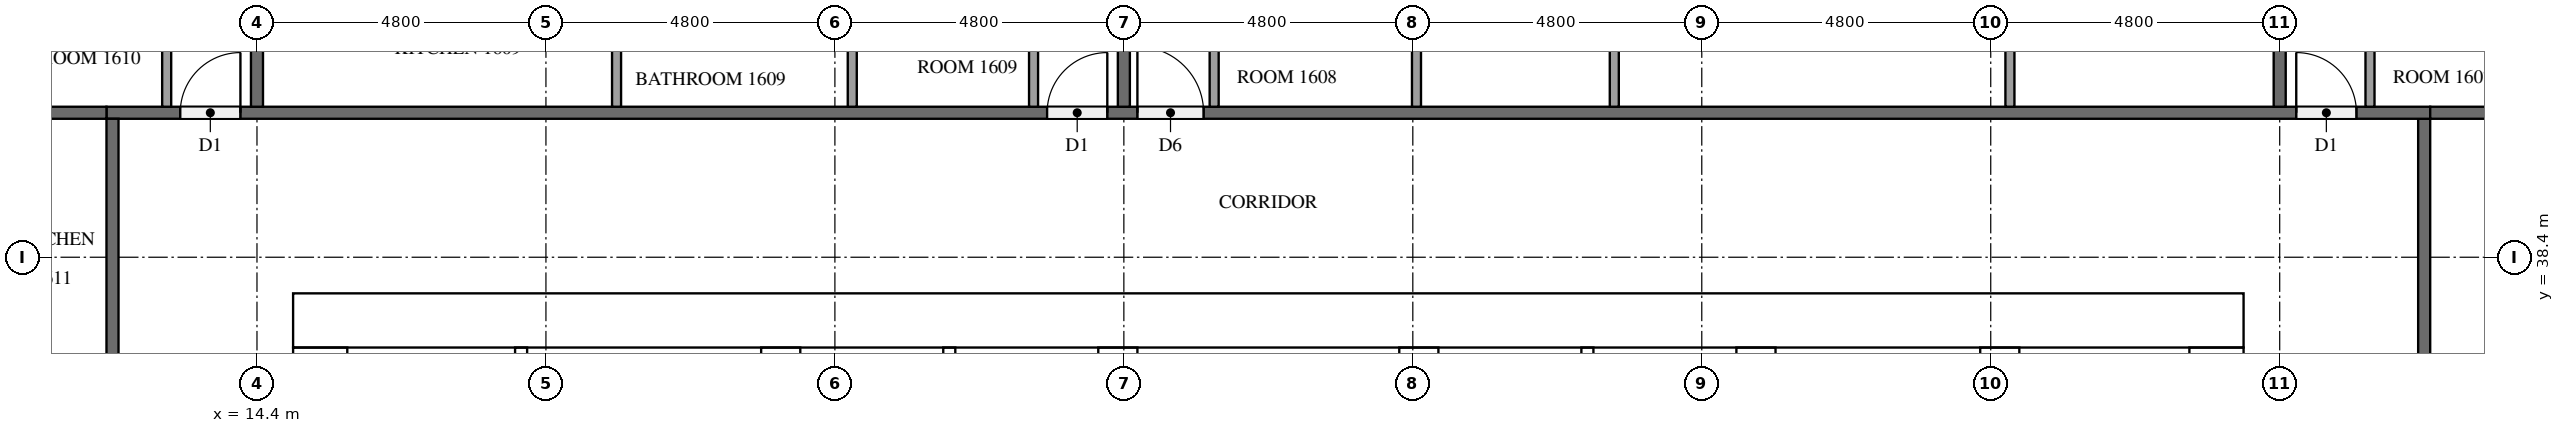
"""IFC4 building model, lengths in metres.
Left out: names, types, materials, properties, quantities, classifications, styles, units other than length and angle.
Written with IfcOpenShell. Run it as: python <this file> out.ifc"""

import sys

from ifc_helpers import new_model, si_unit, direction, frame, frame_2d, origin, place, context, subcontext, project, spatial, rectangle, extrude, element, fill, save


model = new_model("IFC4")
c1 = context("Model", 3, precision=1e-05, world=origin(), true_north=direction((0.0, 1.0)))
c2 = subcontext(c1, "Body", "Model", "MODEL_VIEW")
j1 = project(units=[si_unit("LENGTHUNIT", "METRE"), si_unit("PLANEANGLEUNIT", "RADIAN")], contexts=[c1])
p1 = place(None, origin())
s1 = spatial("IfcSite", under=j1, at=p1, CompositionType="ELEMENT")
p2 = place(p1, origin())
s2 = spatial("IfcBuilding", under=s1, at=p2, CompositionType="ELEMENT")
p3 = place(p2, frame((0.0, 0.0, 66.3)))
s3 = spatial("IfcBuildingStorey", under=s2, at=p3, CompositionType="ELEMENT", Elevation=66.3)
p4 = place(p3, frame((15.0, 37.35, 0.0), z_axis=(0.0, 0.0, 1.0), x_axis=(1.0, 0.0, 0.0)))
e1 = element("IfcWall", 1, at=p4, inside=s3, PredefinedType="SHEAR", context=c2, shape_type="SweptSolid", body=[
    extrude(rectangle(XDim=32.4, YDim=0.9, at=frame_2d((16.2, 0.0))), origin(), (0.0, 0.0, 1.0), 3.2),
])
p5 = place(p4, frame((15.3, 0.0, 0.0)))
e2 = element("IfcOpeningElement", 2, at=p5, cuts=e1, PredefinedType="OPENING", context=c2, shape_type="SweptSolid", body=[
    extrude(rectangle(XDim=1.8, YDim=2.1, at=frame_2d((0.9, 1.05))), frame((0.0, 0.46, 0.0), z_axis=(0.0, -1.0, 0.0), x_axis=(1.0, 0.0, 0.0)), (0.0, 0.0, 1.0), 0.92),
])
p6 = place(p4, frame((1.794, 0.0, 0.0)))
e3 = element("IfcOpeningElement", 3, at=p6, cuts=e1, PredefinedType="OPENING", context=c2, shape_type="SweptSolid", body=[
    extrude(rectangle(XDim=1.0, YDim=2.1, at=frame_2d((0.5, 1.05))), frame((0.0, 0.46, 0.0), z_axis=(0.0, -1.0, 0.0), x_axis=(1.0, 0.0, 0.0)), (0.0, 0.0, 1.0), 0.92),
])
p7 = place(p4, frame((5.331, 0.0, 0.0)))
e4 = element("IfcOpeningElement", 4, at=p7, cuts=e1, PredefinedType="OPENING", context=c2, shape_type="SweptSolid", body=[
    extrude(rectangle(XDim=1.0, YDim=2.1, at=frame_2d((0.5, 1.05))), frame((0.0, 0.46, 0.0), z_axis=(0.0, -1.0, 0.0), x_axis=(1.0, 0.0, 0.0)), (0.0, 0.0, 1.0), 0.92),
])
p8 = place(p3, frame((15.45, 15.9, 0.0), z_axis=(0.0, 0.0, 1.0), x_axis=(0.0, 1.0, 0.0)))
e5 = element("IfcWall", 5, at=p8, inside=s3, PredefinedType="SHEAR", context=c2, shape_type="SweptSolid", body=[
    extrude(rectangle(XDim=21.0, YDim=0.9, at=frame_2d((10.5, 0.0))), origin(), (0.0, 0.0, 1.0), 3.2),
])
p9 = place(p8, frame((4.86, 0.0, 0.0)))
e6 = element("IfcOpeningElement", 6, at=p9, cuts=e5, PredefinedType="OPENING", context=c2, shape_type="SweptSolid", body=[
    extrude(rectangle(XDim=1.2, YDim=2.1, at=frame_2d((0.6, 1.05))), frame((0.0, 0.46, 0.0), z_axis=(0.0, -1.0, 0.0), x_axis=(1.0, 0.0, 0.0)), (0.0, 0.0, 1.0), 0.92),
])
p10 = place(p3, frame((46.95, 15.9, 0.0), z_axis=(0.0, 0.0, 1.0), x_axis=(0.0, 1.0, 0.0)))
e7 = element("IfcWall", 7, at=p10, inside=s3, PredefinedType="SHEAR", context=c2, shape_type="SweptSolid", body=[
    extrude(rectangle(XDim=21.0, YDim=0.9, at=frame_2d((10.5, 0.0))), origin(), (0.0, 0.0, 1.0), 3.2),
])
p11 = place(p10, frame((10.2, 0.0, 0.0)))
e8 = element("IfcOpeningElement", 8, at=p11, cuts=e7, PredefinedType="OPENING", context=c2, shape_type="SweptSolid", body=[
    extrude(rectangle(XDim=1.2, YDim=2.1, at=frame_2d((0.6, 1.05))), frame((0.0, 0.46, 0.0), z_axis=(0.0, -1.0, 0.0), x_axis=(1.0, 0.0, 0.0)), (0.0, 0.0, 1.0), 0.92),
])
p12 = place(p3, frame((23.1, 15.9, 0.0), z_axis=(0.0, 0.0, 1.0), x_axis=(0.0, 1.0, 0.0)))
e9 = element("IfcWall", 9, at=p12, inside=s3, PredefinedType="SHEAR", context=c2, shape_type="SweptSolid", body=[
    extrude(rectangle(XDim=21.0, YDim=0.65, at=frame_2d((10.5, 0.0))), origin(), (0.0, 0.0, 1.0), 3.2),
])
p13 = place(p3, frame((39.3, 27.75, 0.0), z_axis=(0.0, 0.0, 1.0), x_axis=(0.0, 1.0, 0.0)))
e10 = element("IfcWall", 10, at=p13, inside=s3, PredefinedType="SHEAR", context=c2, shape_type="SweptSolid", body=[
    extrude(rectangle(XDim=9.15, YDim=0.65, at=frame_2d((4.575, 0.0))), origin(), (0.0, 0.0, 1.0), 3.2),
])
p14 = place(p3, frame((43.35, 27.75, 0.0), z_axis=(0.0, 0.0, 1.0), x_axis=(0.0, 1.0, 0.0)))
e11 = element("IfcWall", 11, at=p14, inside=s3, PredefinedType="SHEAR", context=c2, shape_type="SweptSolid", body=[
    extrude(rectangle(XDim=9.15, YDim=0.65, at=frame_2d((4.575, 0.0))), origin(), (0.0, 0.0, 1.0), 3.2),
])
p15 = place(p14, frame((7.65, 0.0, 0.0)))
e12 = element("IfcOpeningElement", 12, at=p15, cuts=e11, PredefinedType="OPENING", context=c2, shape_type="SweptSolid", body=[
    extrude(rectangle(XDim=1.2, YDim=2.1, at=frame_2d((0.6, 1.05))), frame((0.0, 0.335, 0.0), z_axis=(0.0, -1.0, 0.0), x_axis=(1.0, 0.0, 0.0)), (0.0, 0.0, 1.0), 0.67),
])
for number, where, z_axis, x_axis in (
    (13, (28.7, 33.875, 0.0), (0.0, 0.0, 1.0), (0.0, 1.0, 0.0)),
    (14, (33.7, 33.875, 0.0), (0.0, 0.0, 1.0), (0.0, 1.0, 0.0)),
):
    element("IfcWall", number, at=place(p3, frame(where, z_axis=z_axis, x_axis=x_axis)), inside=s3, PredefinedType="SHEAR", context=c2, shape_type="SweptSolid", body=[
        extrude(rectangle(XDim=3.025, YDim=0.65, at=frame_2d((1.512, 0.0))), origin(), (0.0, 0.0, 1.0), 3.2),
    ])
for number, where, z_axis, x_axis in (
    (15, (25.9, 33.875, 0.0), (0.0, 0.0, 1.0), (0.0, 1.0, 0.0)),
    (16, (36.5, 33.875, 0.0), (0.0, 0.0, 1.0), (0.0, 1.0, 0.0)),
):
    element("IfcWall", number, at=place(p3, frame(where, z_axis=z_axis, x_axis=x_axis)), inside=s3, PredefinedType="SOLIDWALL", context=c2, shape_type="SweptSolid", body=[
        extrude(rectangle(XDim=3.025, YDim=0.2, at=frame_2d((1.512, 0.0))), origin(), (0.0, 0.0, 1.0), 3.2),
    ])
p16 = place(p3, frame((18.788, 31.575, 0.0), z_axis=(0.0, 0.0, 1.0), x_axis=(0.0, 1.0, 0.0)))
e17 = element("IfcWall", 17, at=p16, inside=s3, PredefinedType="PARTITIONING", context=c2, shape_type="SweptSolid", body=[
    extrude(rectangle(XDim=5.325, YDim=0.2, at=frame_2d((2.663, 0.0))), origin(), (0.0, 0.0, 1.0), 3.2),
])
p17 = place(p3, frame((50.4, 40.7, 0.0), z_axis=(0.0, 0.0, 1.0), x_axis=(0.0, -1.0, 0.0)))
e18 = element("IfcWall", 18, at=p17, inside=s3, PredefinedType="PARTITIONING", context=c2, shape_type="SweptSolid", body=[
    extrude(rectangle(XDim=28.6, YDim=0.2, at=frame_2d((14.3, 0.0))), origin(), (0.0, 0.0, 1.0), 3.2),
])
p18 = place(p17, frame((24.175, 0.0, 0.0)))
e19 = element("IfcOpeningElement", 19, at=p18, cuts=e18, PredefinedType="OPENING", context=c2, shape_type="SweptSolid", body=[
    extrude(rectangle(XDim=1.0, YDim=2.1, at=frame_2d((0.5, 1.05))), frame((0.0, 0.11, 0.0), z_axis=(0.0, -1.0, 0.0), x_axis=(1.0, 0.0, 0.0)), (0.0, 0.0, 1.0), 0.22),
])
p19 = place(p17, frame((22.625, 0.0, 0.0)))
e20 = element("IfcOpeningElement", 20, at=p19, cuts=e18, PredefinedType="OPENING", context=c2, shape_type="SweptSolid", body=[
    extrude(rectangle(XDim=1.0, YDim=2.1, at=frame_2d((0.5, 1.05))), frame((0.0, 0.11, 0.0), z_axis=(0.0, -1.0, 0.0), x_axis=(1.0, 0.0, 0.0)), (0.0, 0.0, 1.0), 0.22),
])
p20 = place(p17, frame((10.625, 0.0, 0.0)))
e21 = element("IfcOpeningElement", 21, at=p20, cuts=e18, PredefinedType="OPENING", context=c2, shape_type="SweptSolid", body=[
    extrude(rectangle(XDim=1.0, YDim=2.1, at=frame_2d((0.5, 1.05))), frame((0.0, 0.11, 0.0), z_axis=(0.0, -1.0, 0.0), x_axis=(1.0, 0.0, 0.0)), (0.0, 0.0, 1.0), 0.22),
])
p21 = place(p3, frame((11.9, 40.8, 0.0), z_axis=(0.0, 0.0, 1.0), x_axis=(1.0, 0.0, 0.0)))
e22 = element("IfcWall", 22, at=p21, inside=s3, PredefinedType="PARTITIONING", context=c2, shape_type="SweptSolid", body=[
    extrude(rectangle(XDim=38.6, YDim=0.2, at=frame_2d((19.3, 0.0))), origin(), (0.0, 0.0, 1.0), 3.2),
])
p22 = place(p21, frame((36.375, 0.0, 0.0)))
e23 = element("IfcOpeningElement", 23, at=p22, cuts=e22, PredefinedType="OPENING", context=c2, shape_type="SweptSolid", body=[
    extrude(rectangle(XDim=1.0, YDim=2.1, at=frame_2d((0.5, 1.05))), frame((0.0, 0.11, 0.0), z_axis=(0.0, -1.0, 0.0), x_axis=(1.0, 0.0, 0.0)), (0.0, 0.0, 1.0), 0.22),
])
p23 = place(p21, frame((17.125, 0.0, 0.0)))
e24 = element("IfcOpeningElement", 24, at=p23, cuts=e22, PredefinedType="OPENING", context=c2, shape_type="SweptSolid", body=[
    extrude(rectangle(XDim=1.1, YDim=2.1, at=frame_2d((0.55, 1.05))), frame((0.0, 0.11, 0.0), z_axis=(0.0, -1.0, 0.0), x_axis=(1.0, 0.0, 0.0)), (0.0, 0.0, 1.0), 0.22),
])
p24 = place(p21, frame((15.625, 0.0, 0.0)))
e25 = element("IfcOpeningElement", 25, at=p24, cuts=e22, PredefinedType="OPENING", context=c2, shape_type="SweptSolid", body=[
    extrude(rectangle(XDim=1.0, YDim=2.1, at=frame_2d((0.5, 1.05))), frame((0.0, 0.11, 0.0), z_axis=(0.0, -1.0, 0.0), x_axis=(1.0, 0.0, 0.0)), (0.0, 0.0, 1.0), 0.22),
])
p25 = place(p21, frame((1.225, 0.0, 0.0)))
e26 = element("IfcOpeningElement", 26, at=p25, cuts=e22, PredefinedType="OPENING", context=c2, shape_type="SweptSolid", body=[
    extrude(rectangle(XDim=1.0, YDim=2.1, at=frame_2d((0.5, 1.05))), frame((0.0, 0.11, 0.0), z_axis=(0.0, -1.0, 0.0), x_axis=(1.0, 0.0, 0.0)), (0.0, 0.0, 1.0), 0.22),
])
p26 = place(p3, frame((12.0, 12.1, 0.0), z_axis=(0.0, 0.0, 1.0), x_axis=(0.0, 1.0, 0.0)))
e27 = element("IfcWall", 27, at=p26, inside=s3, PredefinedType="PARTITIONING", context=c2, shape_type="SweptSolid", body=[
    extrude(rectangle(XDim=28.6, YDim=0.2, at=frame_2d((14.3, 0.0))), origin(), (0.0, 0.0, 1.0), 3.2),
])
p27 = place(p26, frame((19.375, 0.0, 0.0)))
e28 = element("IfcOpeningElement", 28, at=p27, cuts=e27, PredefinedType="OPENING", context=c2, shape_type="SweptSolid", body=[
    extrude(rectangle(XDim=1.0, YDim=2.1, at=frame_2d((0.5, 1.05))), frame((0.0, 0.11, 0.0), z_axis=(0.0, -1.0, 0.0), x_axis=(1.0, 0.0, 0.0)), (0.0, 0.0, 1.0), 0.22),
])
p28 = place(p26, frame((12.175, 0.0, 0.0)))
e29 = element("IfcOpeningElement", 29, at=p28, cuts=e27, PredefinedType="OPENING", context=c2, shape_type="SweptSolid", body=[
    extrude(rectangle(XDim=1.0, YDim=2.1, at=frame_2d((0.5, 1.05))), frame((0.0, 0.11, 0.0), z_axis=(0.0, -1.0, 0.0), x_axis=(1.0, 0.0, 0.0)), (0.0, 0.0, 1.0), 0.22),
])
p29 = place(p26, frame((2.575, 0.0, 0.0)))
e30 = element("IfcOpeningElement", 30, at=p29, cuts=e27, PredefinedType="OPENING", context=c2, shape_type="SweptSolid", body=[
    extrude(rectangle(XDim=1.0, YDim=2.1, at=frame_2d((0.5, 1.05))), frame((0.0, 0.11, 0.0), z_axis=(0.0, -1.0, 0.0), x_axis=(1.0, 0.0, 0.0)), (0.0, 0.0, 1.0), 0.22),
])
p30 = place(p26, frame((1.025, 0.0, 0.0)))
e31 = element("IfcOpeningElement", 31, at=p30, cuts=e27, PredefinedType="OPENING", context=c2, shape_type="SweptSolid", body=[
    extrude(rectangle(XDim=1.0, YDim=2.1, at=frame_2d((0.5, 1.05))), frame((0.0, 0.11, 0.0), z_axis=(0.0, -1.0, 0.0), x_axis=(1.0, 0.0, 0.0)), (0.0, 0.0, 1.0), 0.22),
])
p31 = place(p3, frame((50.5, 40.8, 0.0), z_axis=(0.0, 0.0, 1.0), x_axis=(1.0, 0.0, 0.0)))
e32 = element("IfcWall", 32, at=p31, inside=s3, PredefinedType="PARTITIONING", context=c2, shape_type="SweptSolid", body=[
    extrude(rectangle(XDim=11.8, YDim=0.2, at=frame_2d((5.9, 0.0))), origin(), (0.0, 0.0, 1.0), 3.2),
])
for number, where, z_axis, x_axis in (
    (33, (48.0, 47.575, 0.0), (0.0, 0.0, 1.0), (0.0, -1.0, 0.0)),
    (34, (28.8, 47.575, 0.0), (0.0, 0.0, 1.0), (0.0, -1.0, 0.0)),
):
    element("IfcWall", number, at=place(p3, frame(where, z_axis=z_axis, x_axis=x_axis)), inside=s3, PredefinedType="PARTITIONING", context=c2, shape_type="SweptSolid", body=[
        extrude(rectangle(XDim=6.675, YDim=0.2, at=frame_2d((3.337, 0.0))), origin(), (0.0, 0.0, 1.0), 3.2),
    ])
for number, where, z_axis, x_axis in (
    (35, (14.4, 47.9, 0.0), (0.0, 0.0, 1.0), (0.0, -1.0, 0.0)),
    (36, (4.9, 40.8, 0.0), (0.0, 0.0, 1.0), (1.0, 0.0, 0.0)),
):
    element("IfcWall", number, at=place(p3, frame(where, z_axis=z_axis, x_axis=x_axis)), inside=s3, PredefinedType="PARTITIONING", context=c2, shape_type="SweptSolid", body=[
        extrude(rectangle(XDim=7.0, YDim=0.2, at=frame_2d((3.5, 0.0))), origin(), (0.0, 0.0, 1.0), 3.2),
    ])
p32 = place(p3, frame((49.5, 40.9, 0.0), z_axis=(0.0, 0.0, 1.0), x_axis=(0.0, 1.0, 0.0)))
e37 = element("IfcWall", 37, at=p32, inside=s3, PredefinedType="PARTITIONING", context=c2, shape_type="SweptSolid", body=[
    extrude(rectangle(XDim=1.925, YDim=0.15, at=frame_2d((0.962, 0.0))), origin(), (0.0, 0.0, 1.0), 3.2),
])
for number, where, z_axis, x_axis in (
    (38, (33.661, 40.9, 0.0), (0.0, 0.0, 1.0), (0.0, 1.0, 0.0)),
    (39, (36.947, 40.9, 0.0), (0.0, 0.0, 1.0), (0.0, 1.0, 0.0)),
    (40, (43.519, 40.9, 0.0), (0.0, 0.0, 1.0), (0.0, 1.0, 0.0)),
):
    element("IfcWall", number, at=place(p3, frame(where, z_axis=z_axis, x_axis=x_axis)), inside=s3, PredefinedType="PARTITIONING", context=c2, shape_type="SweptSolid", body=[
        extrude(rectangle(XDim=2.375, YDim=0.15, at=frame_2d((1.188, 0.0))), origin(), (0.0, 0.0, 1.0), 3.2),
    ])
p33 = place(p3, frame((30.3, 40.9, 0.0), z_axis=(0.0, 0.0, 1.0), x_axis=(0.0, 1.0, 0.0)))
e41 = element("IfcWall", 41, at=p33, inside=s3, PredefinedType="PARTITIONING", context=c2, shape_type="SweptSolid", body=[
    extrude(rectangle(XDim=2.525, YDim=0.15, at=frame_2d((1.263, 0.0))), origin(), (0.0, 0.0, 1.0), 3.2),
])
for number, where, z_axis, x_axis in (
    (42, (24.289, 40.9, 0.0), (0.0, 0.0, 1.0), (0.0, 1.0, 0.0)),
    (43, (20.373, 40.9, 0.0), (0.0, 0.0, 1.0), (0.0, 1.0, 0.0)),
):
    element("IfcWall", number, at=place(p3, frame(where, z_axis=z_axis, x_axis=x_axis)), inside=s3, PredefinedType="PARTITIONING", context=c2, shape_type="SweptSolid", body=[
        extrude(rectangle(XDim=1.775, YDim=0.15, at=frame_2d((0.888, 0.0))), origin(), (0.0, 0.0, 1.0), 3.2),
    ])
for number, where, z_axis, x_axis in (
    (44, (27.3, 40.9, 0.0), (0.0, 0.0, 1.0), (0.0, 1.0, 0.0)),
    (45, (12.9, 40.9, 0.0), (0.0, 0.0, 1.0), (0.0, 1.0, 0.0)),
):
    element("IfcWall", number, at=place(p3, frame(where, z_axis=z_axis, x_axis=x_axis)), inside=s3, PredefinedType="PARTITIONING", context=c2, shape_type="SweptSolid", body=[
        extrude(rectangle(XDim=1.925, YDim=0.15, at=frame_2d((0.962, 0.0))), origin(), (0.0, 0.0, 1.0), 3.2),
    ])
p34 = place(p5, origin())
e46 = element("IfcDoor", 46, at=p34, inside=s3, OperationType="DOUBLE_DOOR_SINGLE_SWING", PredefinedType="DOOR", context=c2, shape_type="SweptSolid", body=[
    extrude(rectangle(XDim=1.8, YDim=2.1, at=frame_2d((0.9, 1.05))), frame((0.0, 0.025, 0.0), z_axis=(0.0, -1.0, 0.0), x_axis=(1.0, 0.0, 0.0)), (0.0, 0.0, 1.0), 0.05),
])
fill(e2, e46)
p35 = place(p6, origin())
e47 = element("IfcDoor", 47, at=p35, inside=s3, OperationType="SINGLE_SWING_LEFT", PredefinedType="DOOR", context=c2, shape_type="SweptSolid", body=[
    extrude(rectangle(XDim=1.0, YDim=2.1, at=frame_2d((0.5, 1.05))), frame((0.0, 0.025, 0.0), z_axis=(0.0, -1.0, 0.0), x_axis=(1.0, 0.0, 0.0)), (0.0, 0.0, 1.0), 0.05),
])
fill(e3, e47)
p36 = place(p7, origin())
e48 = element("IfcDoor", 48, at=p36, inside=s3, OperationType="SINGLE_SWING_RIGHT", PredefinedType="DOOR", context=c2, shape_type="SweptSolid", body=[
    extrude(rectangle(XDim=1.0, YDim=2.1, at=frame_2d((0.5, 1.05))), frame((0.0, 0.025, 0.0), z_axis=(0.0, -1.0, 0.0), x_axis=(1.0, 0.0, 0.0)), (0.0, 0.0, 1.0), 0.05),
])
fill(e4, e48)
p37 = place(p22, origin())
e49 = element("IfcDoor", 49, at=p37, inside=s3, OperationType="SINGLE_SWING_LEFT", PredefinedType="DOOR", context=c2, shape_type="SweptSolid", body=[
    extrude(rectangle(XDim=1.0, YDim=2.1, at=frame_2d((0.5, 1.05))), frame((0.0, 0.025, 0.0), z_axis=(0.0, -1.0, 0.0), x_axis=(1.0, 0.0, 0.0)), (0.0, 0.0, 1.0), 0.05),
])
fill(e23, e49)
p38 = place(p23, origin())
e50 = element("IfcDoor", 50, at=p38, inside=s3, OperationType="SINGLE_SWING_LEFT", PredefinedType="DOOR", context=c2, shape_type="SweptSolid", body=[
    extrude(rectangle(XDim=1.1, YDim=2.1, at=frame_2d((0.55, 1.05))), frame((0.0, 0.025, 0.0), z_axis=(0.0, -1.0, 0.0), x_axis=(1.0, 0.0, 0.0)), (0.0, 0.0, 1.0), 0.05),
])
fill(e24, e50)
p39 = place(p24, origin())
e51 = element("IfcDoor", 51, at=p39, inside=s3, OperationType="SINGLE_SWING_RIGHT", PredefinedType="DOOR", context=c2, shape_type="SweptSolid", body=[
    extrude(rectangle(XDim=1.0, YDim=2.1, at=frame_2d((0.5, 1.05))), frame((0.0, 0.025, 0.0), z_axis=(0.0, -1.0, 0.0), x_axis=(1.0, 0.0, 0.0)), (0.0, 0.0, 1.0), 0.05),
])
fill(e25, e51)
p40 = place(p25, origin())
e52 = element("IfcDoor", 52, at=p40, inside=s3, OperationType="SINGLE_SWING_RIGHT", PredefinedType="DOOR", context=c2, shape_type="SweptSolid", body=[
    extrude(rectangle(XDim=1.0, YDim=2.1, at=frame_2d((0.5, 1.05))), frame((0.0, 0.025, 0.0), z_axis=(0.0, -1.0, 0.0), x_axis=(1.0, 0.0, 0.0)), (0.0, 0.0, 1.0), 0.05),
])
fill(e26, e52)
save(model, sys.argv[1])
